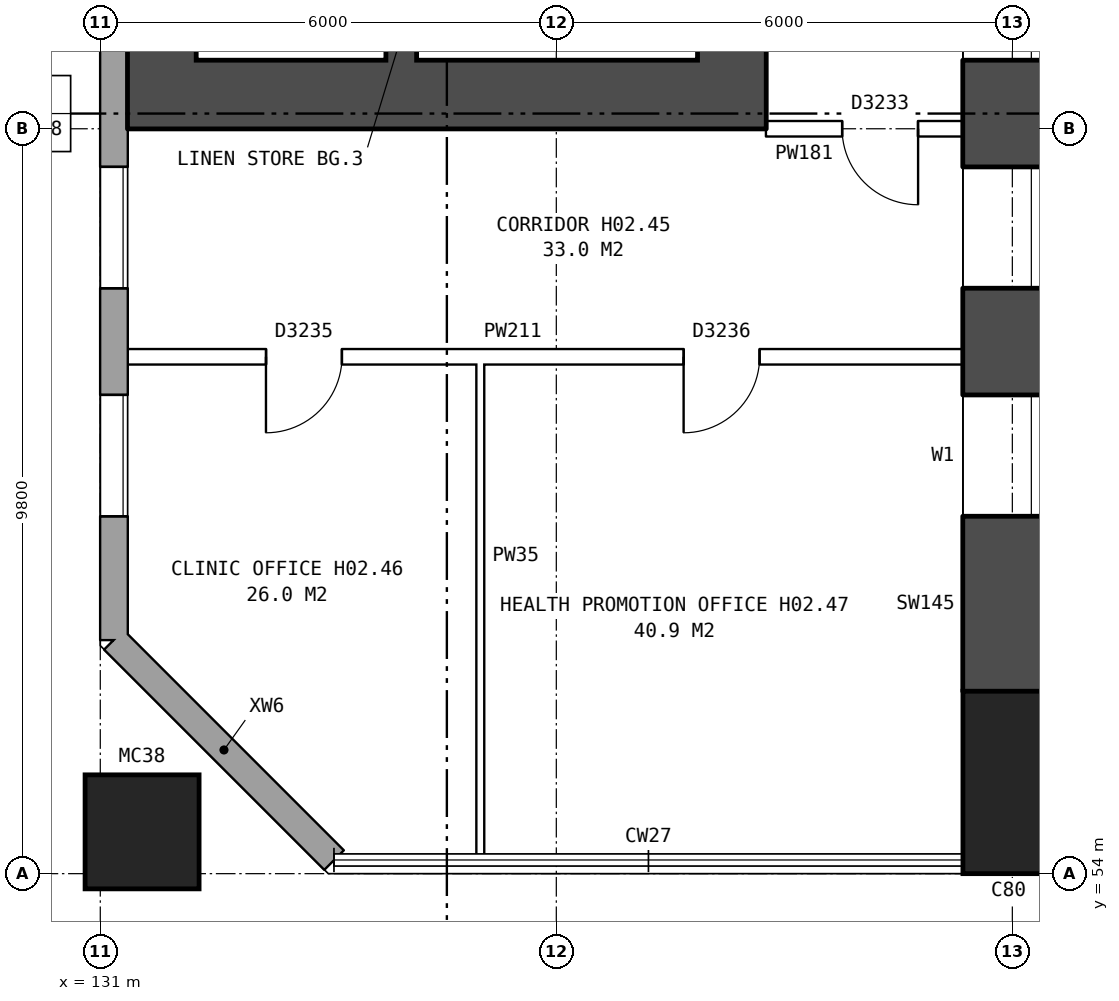
"""IFC4 building model, lengths in metres.
Left out: names, types, materials, properties, quantities, classifications, styles, units other than length and angle.
Written with IfcOpenShell. Run it as: python <this file> out.ifc"""

import sys

from ifc_helpers import new_model, si_unit, direction, frame, frame_2d, origin, origin_2d, place, context, subcontext, project, spatial, rectangle, hollow_rectangle, extrude, element, fill, save


model = new_model("IFC4")
c1 = context("Model", 3, precision=1e-05, world=origin(), true_north=direction((0.0, 1.0)))
c2 = subcontext(c1, "Body", "Model", "MODEL_VIEW")
j1 = project(units=[si_unit("LENGTHUNIT", "METRE"), si_unit("PLANEANGLEUNIT", "RADIAN")], contexts=[c1])
p1 = place(None, origin())
s1 = spatial("IfcSite", under=j1, at=p1, CompositionType="ELEMENT")
p2 = place(p1, origin())
s2 = spatial("IfcBuilding", under=s1, at=p2, CompositionType="ELEMENT")
p3 = place(p2, frame((0.0, 0.0, 10.1)))
s3 = spatial("IfcBuildingStorey", under=s2, at=p3, CompositionType="ELEMENT", Elevation=10.1)
p4 = place(p3, frame((142.95, 55.2, -0.3), z_axis=(0.0, 0.0, 1.0), x_axis=(1.0, 0.0, 0.0)))
e1 = element("IfcColumn", 1, at=p4, inside=s3, PredefinedType="COLUMN", context=c2, shape_type="SweptSolid", body=[
    extrude(rectangle(XDim=1.2, YDim=2.4, at=origin_2d()), origin(), (0.0, 0.0, 1.0), 4.4),
])
p5 = place(p3, frame((142.95, 56.4, -0.3), z_axis=(0.0, 0.0, 1.0), x_axis=(0.0, 1.0, 0.0)))
e2 = element("IfcWall", 2, at=p5, inside=s3, PredefinedType="SHEAR", context=c2, shape_type="SweptSolid", body=[
    extrude(rectangle(XDim=27.2, YDim=1.2, at=frame_2d((13.6, 0.0))), origin(), (0.0, 0.0, 1.0), 4.4),
])
p6 = place(p5, frame((2.3, 0.0, 0.8)))
e3 = element("IfcOpeningElement", 3, at=p6, cuts=e2, PredefinedType="OPENING", context=c2, shape_type="SweptSolid", body=[
    extrude(rectangle(XDim=1.6, YDim=1.8, at=frame_2d((0.8, 0.9))), frame((0.0, 0.61, 0.0), z_axis=(0.0, -1.0, 0.0), x_axis=(1.0, 0.0, 0.0)), (0.0, 0.0, 1.0), 1.22),
])
p7 = place(p5, frame((5.3, 0.0, 0.8)))
e4 = element("IfcOpeningElement", 4, at=p7, cuts=e2, PredefinedType="OPENING", context=c2, shape_type="SweptSolid", body=[
    extrude(rectangle(XDim=1.6, YDim=1.8, at=frame_2d((0.8, 0.9))), frame((0.0, 0.61, 0.0), z_axis=(0.0, -1.0, 0.0), x_axis=(1.0, 0.0, 0.0)), (0.0, 0.0, 1.0), 1.22),
])
p8 = place(p5, frame((8.3, 0.0, 0.8)))
e5 = element("IfcOpeningElement", 5, at=p8, cuts=e2, PredefinedType="OPENING", context=c2, shape_type="SweptSolid", body=[
    extrude(rectangle(XDim=1.6, YDim=1.8, at=frame_2d((0.8, 0.9))), frame((0.0, 0.61, 0.0), z_axis=(0.0, -1.0, 0.0), x_axis=(1.0, 0.0, 0.0)), (0.0, 0.0, 1.0), 1.22),
])
p9 = place(p5, frame((11.3, 0.0, 0.8)))
e6 = element("IfcOpeningElement", 6, at=p9, cuts=e2, PredefinedType="OPENING", context=c2, shape_type="SweptSolid", body=[
    extrude(rectangle(XDim=1.6, YDim=1.8, at=frame_2d((0.8, 0.9))), frame((0.0, 0.61, 0.0), z_axis=(0.0, -1.0, 0.0), x_axis=(1.0, 0.0, 0.0)), (0.0, 0.0, 1.0), 1.22),
])
p10 = place(p5, frame((14.3, 0.0, 0.8)))
e7 = element("IfcOpeningElement", 7, at=p10, cuts=e2, PredefinedType="OPENING", context=c2, shape_type="SweptSolid", body=[
    extrude(rectangle(XDim=1.6, YDim=1.8, at=frame_2d((0.8, 0.9))), frame((0.0, 0.61, 0.0), z_axis=(0.0, -1.0, 0.0), x_axis=(1.0, 0.0, 0.0)), (0.0, 0.0, 1.0), 1.22),
])
p11 = place(p5, frame((17.3, 0.0, 0.8)))
e8 = element("IfcOpeningElement", 8, at=p11, cuts=e2, PredefinedType="OPENING", context=c2, shape_type="SweptSolid", body=[
    extrude(rectangle(XDim=1.6, YDim=1.8, at=frame_2d((0.8, 0.9))), frame((0.0, 0.61, 0.0), z_axis=(0.0, -1.0, 0.0), x_axis=(1.0, 0.0, 0.0)), (0.0, 0.0, 1.0), 1.22),
])
p12 = place(p5, frame((20.3, 0.0, 0.8)))
e9 = element("IfcOpeningElement", 9, at=p12, cuts=e2, PredefinedType="OPENING", context=c2, shape_type="SweptSolid", body=[
    extrude(rectangle(XDim=1.6, YDim=1.8, at=frame_2d((0.8, 0.9))), frame((0.0, 0.61, 0.0), z_axis=(0.0, -1.0, 0.0), x_axis=(1.0, 0.0, 0.0)), (0.0, 0.0, 1.0), 1.22),
])
p13 = place(p5, frame((23.3, 0.0, 0.8)))
e10 = element("IfcOpeningElement", 10, at=p13, cuts=e2, PredefinedType="OPENING", context=c2, shape_type="SweptSolid", body=[
    extrude(rectangle(XDim=1.6, YDim=1.8, at=frame_2d((0.8, 0.9))), frame((0.0, 0.61, 0.0), z_axis=(0.0, -1.0, 0.0), x_axis=(1.0, 0.0, 0.0)), (0.0, 0.0, 1.0), 1.22),
])
p14 = place(p3, frame((131.55, 54.55, 0.0), z_axis=(0.0, 0.0, 1.0), x_axis=(1.0, 0.0, 0.0)))
e11 = element("IfcColumn", 11, at=p14, inside=s3, PredefinedType="COLUMN", context=c2, shape_type="SweptSolid", body=[
    extrude(hollow_rectangle(XDim=1.5, YDim=1.5, WallThickness=0.08, at=origin_2d()), origin(), (0.0, 0.0, 1.0), 4.6),
])
p15 = place(p3, frame((131.18, 57.075, 0.0), z_axis=(0.0, 0.0, 1.0), x_axis=(0.707106781187, -0.707106781187, 0.0)))
e12 = element("IfcWall", 12, at=p15, inside=s3, PredefinedType="STANDARD", context=c2, shape_type="SweptSolid", body=[
    extrude(rectangle(XDim=4.094, YDim=0.36, at=frame_2d((2.047, 0.0))), origin(), (0.0, 0.0, 1.0), 4.3),
])
p16 = place(p3, frame((131.18, 82.925, 0.0), z_axis=(0.0, 0.0, 1.0), x_axis=(0.0, -1.0, 0.0)))
e13 = element("IfcWall", 13, at=p16, inside=s3, PredefinedType="STANDARD", context=c2, shape_type="SweptSolid", body=[
    extrude(rectangle(XDim=25.851, YDim=0.36, at=frame_2d((12.925, 0.0))), origin(), (0.0, 0.0, 1.0), 4.3),
])
p17 = place(p16, frame((1.625, 0.0, 0.8)))
e14 = element("IfcOpeningElement", 14, at=p17, cuts=e13, PredefinedType="OPENING", context=c2, shape_type="SweptSolid", body=[
    extrude(rectangle(XDim=1.6, YDim=1.8, at=frame_2d((0.8, 0.9))), frame((0.0, 0.19, 0.0), z_axis=(0.0, -1.0, 0.0), x_axis=(1.0, 0.0, 0.0)), (0.0, 0.0, 1.0), 0.38),
])
p18 = place(p16, frame((4.625, 0.0, 0.8)))
e15 = element("IfcOpeningElement", 15, at=p18, cuts=e13, PredefinedType="OPENING", context=c2, shape_type="SweptSolid", body=[
    extrude(rectangle(XDim=1.6, YDim=1.8, at=frame_2d((0.8, 0.9))), frame((0.0, 0.19, 0.0), z_axis=(0.0, -1.0, 0.0), x_axis=(1.0, 0.0, 0.0)), (0.0, 0.0, 1.0), 0.38),
])
p19 = place(p16, frame((19.625, 0.0, 0.8)))
e16 = element("IfcOpeningElement", 16, at=p19, cuts=e13, PredefinedType="OPENING", context=c2, shape_type="SweptSolid", body=[
    extrude(rectangle(XDim=1.6, YDim=1.8, at=frame_2d((0.8, 0.9))), frame((0.0, 0.19, 0.0), z_axis=(0.0, -1.0, 0.0), x_axis=(1.0, 0.0, 0.0)), (0.0, 0.0, 1.0), 0.38),
])
p20 = place(p16, frame((22.625, 0.0, 0.8)))
e17 = element("IfcOpeningElement", 17, at=p20, cuts=e13, PredefinedType="OPENING", context=c2, shape_type="SweptSolid", body=[
    extrude(rectangle(XDim=1.6, YDim=1.8, at=frame_2d((0.8, 0.9))), frame((0.0, 0.19, 0.0), z_axis=(0.0, -1.0, 0.0), x_axis=(1.0, 0.0, 0.0)), (0.0, 0.0, 1.0), 0.38),
])
p21 = place(p3, frame((139.31, 64.7, 0.0), z_axis=(0.0, 0.0, 1.0), x_axis=(0.0, 1.0, 0.0)))
e18 = element("IfcWall", 18, at=p21, inside=s3, PredefinedType="SHEAR", context=c2, shape_type="SweptSolid", body=[
    extrude(rectangle(XDim=10.6, YDim=0.9, at=frame_2d((5.3, 0.0))), origin(), (0.0, 0.0, 1.0), 4.3),
])
p22 = place(p21, frame((0.425, 0.0, 0.0)))
e19 = element("IfcOpeningElement", 19, at=p22, cuts=e18, PredefinedType="OPENING", context=c2, shape_type="SweptSolid", body=[
    extrude(rectangle(XDim=1.1, YDim=2.1, at=frame_2d((0.55, 1.05))), frame((0.0, 0.46, 0.0), z_axis=(0.0, -1.0, 0.0), x_axis=(1.0, 0.0, 0.0)), (0.0, 0.0, 1.0), 0.92),
])
p23 = place(p21, frame((9.0, 0.0, 0.0)))
e20 = element("IfcOpeningElement", 20, at=p23, cuts=e18, PredefinedType="OPENING", context=c2, shape_type="SweptSolid", body=[
    extrude(rectangle(XDim=1.1, YDim=2.1, at=frame_2d((0.55, 1.05))), frame((0.0, 0.46, 0.0), z_axis=(0.0, -1.0, 0.0), x_axis=(1.0, 0.0, 0.0)), (0.0, 0.0, 1.0), 0.92),
])
p24 = place(p21, frame((7.225, 0.0, 0.0)))
e21 = element("IfcOpeningElement", 21, at=p24, cuts=e18, PredefinedType="OPENING", context=c2, shape_type="SweptSolid", body=[
    extrude(rectangle(XDim=0.85, YDim=2.1, at=frame_2d((0.425, 1.05))), frame((0.0, 0.46, 0.0), z_axis=(0.0, -1.0, 0.0), x_axis=(1.0, 0.0, 0.0)), (0.0, 0.0, 1.0), 0.92),
])
p25 = place(p3, frame((131.81, 64.7, 0.0), z_axis=(0.0, 0.0, 1.0), x_axis=(0.0, 1.0, 0.0)))
e22 = element("IfcWall", 22, at=p25, inside=s3, PredefinedType="SHEAR", context=c2, shape_type="SweptSolid", body=[
    extrude(rectangle(XDim=10.6, YDim=0.9, at=frame_2d((5.3, 0.0))), origin(), (0.0, 0.0, 1.0), 4.3),
])
p26 = place(p3, frame((139.76, 64.25, 0.0), z_axis=(0.0, 0.0, 1.0), x_axis=(-1.0, 0.0, 0.0)))
e23 = element("IfcWall", 23, at=p26, inside=s3, PredefinedType="SHEAR", context=c2, shape_type="SweptSolid", body=[
    extrude(rectangle(XDim=8.4, YDim=0.9, at=frame_2d((4.2, 0.0))), origin(), (0.0, 0.0, 1.0), 4.3),
])
p27 = place(p3, frame((134.96, 64.7, 0.0), z_axis=(0.0, 0.0, 1.0), x_axis=(0.0, 1.0, 0.0)))
e24 = element("IfcWall", 24, at=p27, inside=s3, PredefinedType="SHEAR", context=c2, shape_type="SweptSolid", body=[
    extrude(rectangle(XDim=6.35, YDim=0.4, at=frame_2d((3.175, 0.0))), origin(), (0.0, 0.0, 1.0), 4.3),
])
p28 = place(p3, frame((131.24, 60.8, 0.0), z_axis=(0.0, 0.0, 1.0), x_axis=(1.0, 0.0, 0.0)))
e25 = element("IfcWall", 25, at=p28, inside=s3, PredefinedType="PARTITIONING", context=c2, shape_type="SweptSolid", body=[
    extrude(rectangle(XDim=11.23, YDim=0.2, at=frame_2d((5.615, 0.0))), origin(), (0.0, 0.0, 1.0), 4.3),
])
p29 = place(p28, frame((1.94, 0.0, 0.0)))
e26 = element("IfcOpeningElement", 26, at=p29, cuts=e25, PredefinedType="OPENING", context=c2, shape_type="SweptSolid", body=[
    extrude(rectangle(XDim=1.0, YDim=2.1, at=frame_2d((0.5, 1.05))), frame((0.0, 0.11, 0.0), z_axis=(0.0, -1.0, 0.0), x_axis=(1.0, 0.0, 0.0)), (0.0, 0.0, 1.0), 0.22),
])
p30 = place(p28, frame((7.435, 0.0, 0.0)))
e27 = element("IfcOpeningElement", 27, at=p30, cuts=e25, PredefinedType="OPENING", context=c2, shape_type="SweptSolid", body=[
    extrude(rectangle(XDim=1.0, YDim=2.1, at=frame_2d((0.5, 1.05))), frame((0.0, 0.11, 0.0), z_axis=(0.0, -1.0, 0.0), x_axis=(1.0, 0.0, 0.0)), (0.0, 0.0, 1.0), 0.22),
])
p31 = place(p3, frame((139.76, 63.8, 0.0), z_axis=(0.0, 0.0, 1.0), x_axis=(1.0, 0.0, 0.0)))
e28 = element("IfcWall", 28, at=p31, inside=s3, PredefinedType="PARTITIONING", context=c2, shape_type="SweptSolid", body=[
    extrude(rectangle(XDim=2.59, YDim=0.2, at=frame_2d((1.295, 0.0))), origin(), (0.0, 0.0, 1.0), 4.3),
])
p32 = place(p31, frame((1.0, 0.0, 0.0)))
e29 = element("IfcOpeningElement", 29, at=p32, cuts=e28, PredefinedType="OPENING", context=c2, shape_type="SweptSolid", body=[
    extrude(rectangle(XDim=1.0, YDim=2.1, at=frame_2d((0.5, 1.05))), frame((0.0, 0.11, 0.0), z_axis=(0.0, -1.0, 0.0), x_axis=(1.0, 0.0, 0.0)), (0.0, 0.0, 1.0), 0.22),
])
p33 = place(p3, frame((136.0, 54.24, 0.0), z_axis=(0.0, 0.0, 1.0), x_axis=(0.0, 1.0, 0.0)))
e30 = element("IfcWall", 30, at=p33, inside=s3, PredefinedType="PARTITIONING", context=c2, shape_type="SweptSolid", body=[
    extrude(rectangle(XDim=6.66, YDim=0.1, at=frame_2d((3.33, 0.0))), origin(), (0.0, 0.0, 1.0), 4.3),
])
p34 = place(p19, origin())
e31 = element("IfcWindow", 31, at=p34, inside=s3, PartitioningType="SINGLE_PANEL", PredefinedType="WINDOW", context=c2, shape_type="SweptSolid", body=[
    extrude(rectangle(XDim=1.6, YDim=1.8, at=frame_2d((0.8, 0.9))), frame((0.0, 0.15, 0.0), z_axis=(0.0, -1.0, 0.0), x_axis=(1.0, 0.0, 0.0)), (0.0, 0.0, 1.0), 0.06),
])
fill(e16, e31)
p35 = place(p20, origin())
e32 = element("IfcWindow", 32, at=p35, inside=s3, PartitioningType="SINGLE_PANEL", PredefinedType="WINDOW", context=c2, shape_type="SweptSolid", body=[
    extrude(rectangle(XDim=1.6, YDim=1.8, at=frame_2d((0.8, 0.9))), frame((0.0, 0.15, 0.0), z_axis=(0.0, -1.0, 0.0), x_axis=(1.0, 0.0, 0.0)), (0.0, 0.0, 1.0), 0.06),
])
fill(e17, e32)
p36 = place(p6, origin())
e33 = element("IfcWindow", 33, at=p36, inside=s3, PartitioningType="SINGLE_PANEL", PredefinedType="WINDOW", context=c2, shape_type="SweptSolid", body=[
    extrude(rectangle(XDim=1.6, YDim=1.8, at=frame_2d((0.8, 0.9))), frame((0.0, -0.27, 0.0), z_axis=(0.0, -1.0, 0.0), x_axis=(1.0, 0.0, 0.0)), (0.0, 0.0, 1.0), 0.06),
])
fill(e3, e33)
p37 = place(p7, origin())
e34 = element("IfcWindow", 34, at=p37, inside=s3, PartitioningType="SINGLE_PANEL", PredefinedType="WINDOW", context=c2, shape_type="SweptSolid", body=[
    extrude(rectangle(XDim=1.6, YDim=1.8, at=frame_2d((0.8, 0.9))), frame((0.0, -0.27, 0.0), z_axis=(0.0, -1.0, 0.0), x_axis=(1.0, 0.0, 0.0)), (0.0, 0.0, 1.0), 0.06),
])
fill(e4, e34)
p38 = place(p8, origin())
e35 = element("IfcWindow", 35, at=p38, inside=s3, PartitioningType="SINGLE_PANEL", PredefinedType="WINDOW", context=c2, shape_type="SweptSolid", body=[
    extrude(rectangle(XDim=1.6, YDim=1.8, at=frame_2d((0.8, 0.9))), frame((0.0, -0.27, 0.0), z_axis=(0.0, -1.0, 0.0), x_axis=(1.0, 0.0, 0.0)), (0.0, 0.0, 1.0), 0.06),
])
fill(e5, e35)
p39 = place(p29, frame((1.0, 0.0, 0.0), z_axis=(0.0, 0.0, 1.0), x_axis=(-1.0, 0.0, 0.0)))
e36 = element("IfcDoor", 36, at=p39, inside=s3, OperationType="SINGLE_SWING_RIGHT", PredefinedType="DOOR", context=c2, shape_type="SweptSolid", body=[
    extrude(rectangle(XDim=1.0, YDim=2.1, at=frame_2d((0.5, 1.05))), frame((0.0, 0.025, 0.0), z_axis=(0.0, -1.0, 0.0), x_axis=(1.0, 0.0, 0.0)), (0.0, 0.0, 1.0), 0.05),
])
fill(e26, e36)
p40 = place(p30, frame((1.0, 0.0, 0.0), z_axis=(0.0, 0.0, 1.0), x_axis=(-1.0, 0.0, 0.0)))
e37 = element("IfcDoor", 37, at=p40, inside=s3, OperationType="SINGLE_SWING_RIGHT", PredefinedType="DOOR", context=c2, shape_type="SweptSolid", body=[
    extrude(rectangle(XDim=1.0, YDim=2.1, at=frame_2d((0.5, 1.05))), frame((0.0, 0.025, 0.0), z_axis=(0.0, -1.0, 0.0), x_axis=(1.0, 0.0, 0.0)), (0.0, 0.0, 1.0), 0.05),
])
fill(e27, e37)
p41 = place(p32, frame((1.0, 0.0, 0.0), z_axis=(0.0, 0.0, 1.0), x_axis=(-1.0, 0.0, 0.0)))
e38 = element("IfcDoor", 38, at=p41, inside=s3, OperationType="SINGLE_SWING_LEFT", PredefinedType="DOOR", context=c2, shape_type="SweptSolid", body=[
    extrude(rectangle(XDim=1.0, YDim=2.1, at=frame_2d((0.5, 1.05))), frame((0.0, 0.025, 0.0), z_axis=(0.0, -1.0, 0.0), x_axis=(1.0, 0.0, 0.0)), (0.0, 0.0, 1.0), 0.05),
])
fill(e29, e38)
save(model, sys.argv[1])
